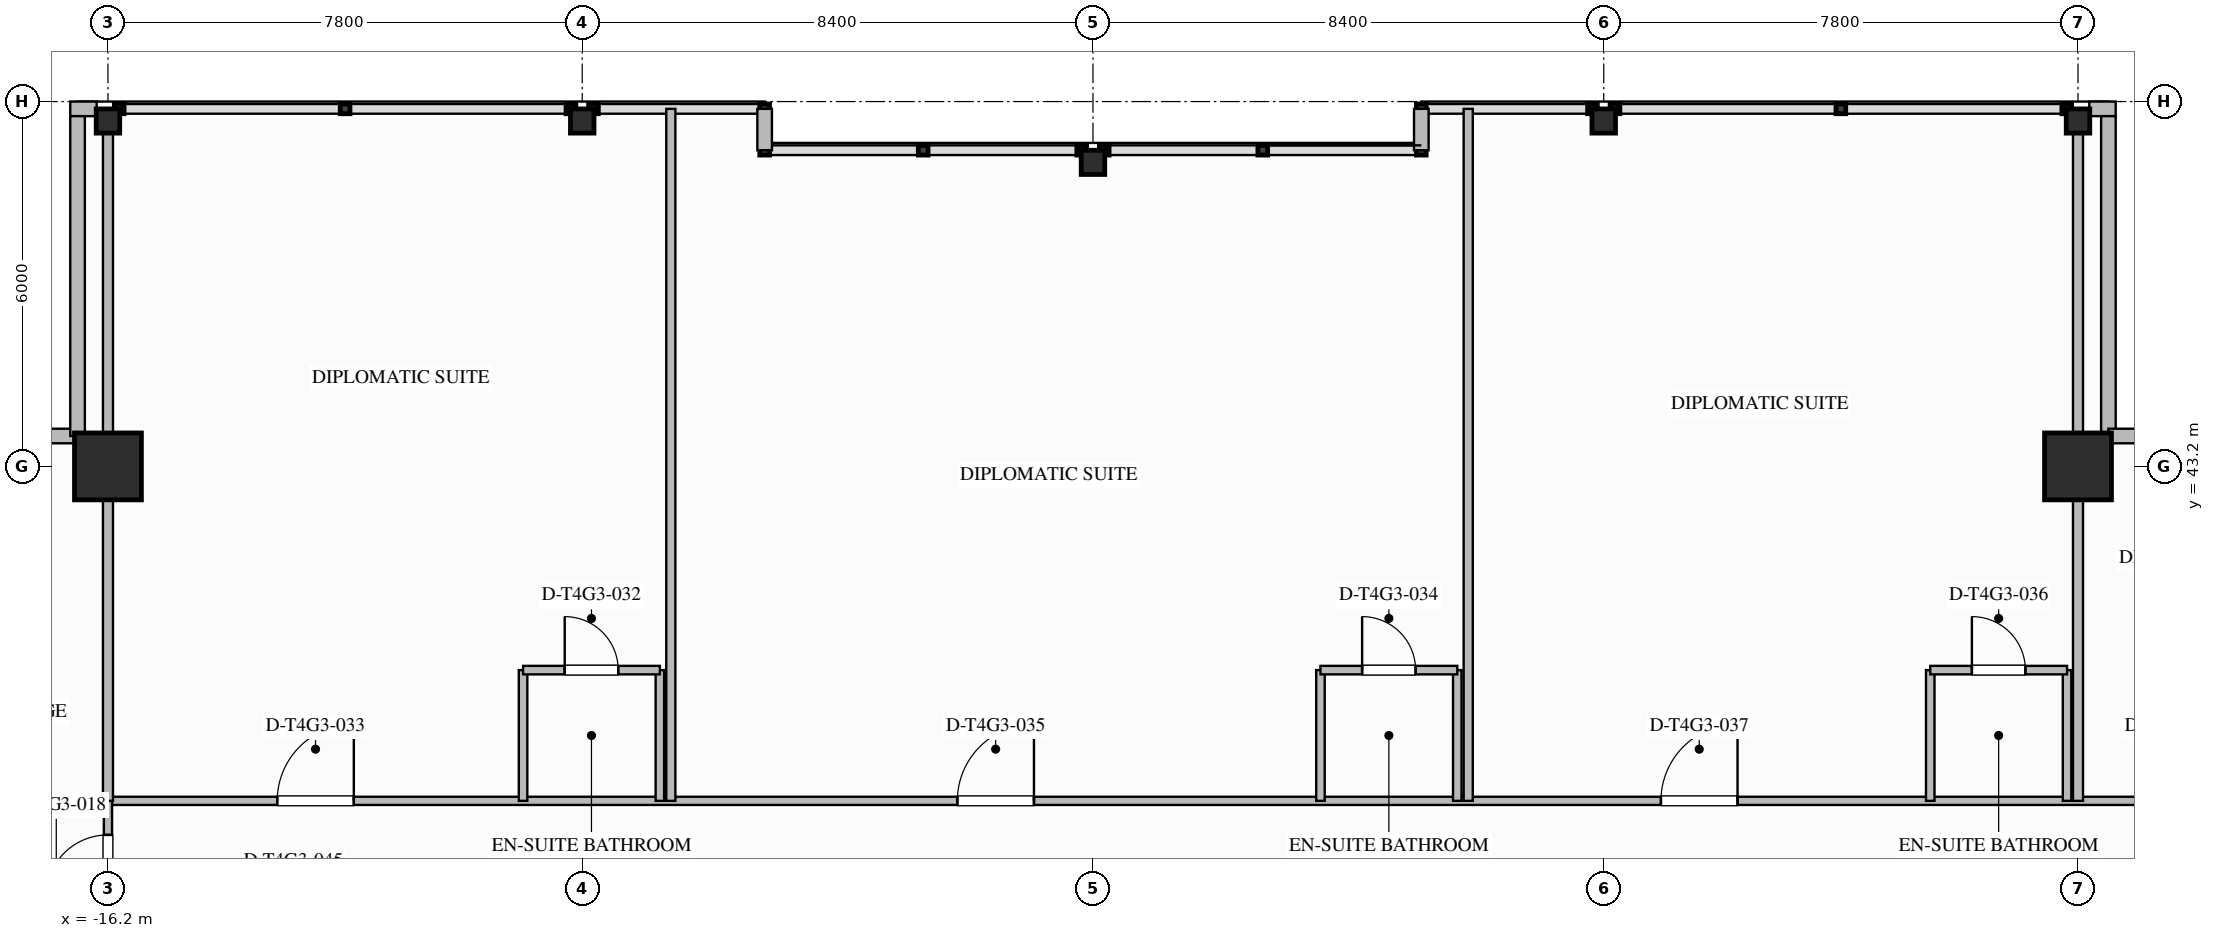
"""IFC4 building model, lengths in metres.
Left out: names, types, materials, properties, quantities, classifications, styles, units other than length and angle.
Written with IfcOpenShell. Run it as: python <this file> out.ifc"""

import sys

from ifc_helpers import new_model, si_unit, direction, frame, frame_2d, origin, origin_2d, place, context, subcontext, project, spatial, rectangle, i_section, extrude, element, fill, save


model = new_model("IFC4")
c1 = context("Model", 3, precision=1e-05, world=origin(), true_north=direction((0.0, 1.0)))
c2 = subcontext(c1, "Body", "Model", "MODEL_VIEW")
j1 = project(units=[si_unit("LENGTHUNIT", "METRE"), si_unit("PLANEANGLEUNIT", "RADIAN")], contexts=[c1])
p1 = place(None, origin())
s1 = spatial("IfcSite", under=j1, at=p1, CompositionType="ELEMENT")
p2 = place(p1, origin())
s2 = spatial("IfcBuilding", under=s1, at=p2, CompositionType="ELEMENT")
p3 = place(p2, frame((0.0, 0.0, 226.7)))
s3 = spatial("IfcBuildingStorey", under=s2, at=p3, CompositionType="ELEMENT", Elevation=226.7)
for number, where, z_axis, x_axis in (
    (1, (-16.2, 43.2, 0.0), (0.0, 0.0, 1.0), (1.0, 0.0, 0.0)),
    (2, (16.2, 43.2, 0.0), (0.0, 0.0, 1.0), (1.0, 0.0, 0.0)),
):
    element("IfcColumn", number, at=place(p3, frame(where, z_axis=z_axis, x_axis=x_axis)), inside=s3, PredefinedType="COLUMN", context=c2, shape_type="SweptSolid", body=[
        extrude(rectangle(XDim=1.1, YDim=1.1, at=origin_2d()), origin(), (0.0, 0.0, 1.0), 3.6),
    ])
for number, where, z_axis, x_axis in (
    (3, (-16.2, 48.88, 0.0), (0.0, 0.0, 1.0), (0.0, 1.0, 0.0)),
    (4, (-8.4, 48.88, 0.0), (0.0, 0.0, 1.0), (0.0, 1.0, 0.0)),
    (5, (0.0, 48.2, 0.0), (0.0, 0.0, 1.0), (0.0, 1.0, 0.0)),
    (6, (8.4, 48.88, 0.0), (0.0, 0.0, 1.0), (0.0, 1.0, 0.0)),
    (7, (16.2, 48.88, 0.0), (0.0, 0.0, 1.0), (0.0, 1.0, 0.0)),
):
    element("IfcColumn", number, at=place(p3, frame(where, z_axis=z_axis, x_axis=x_axis)), inside=s3, PredefinedType="COLUMN", context=c2, shape_type="SweptSolid", body=[
        extrude(i_section(OverallWidth=0.397, OverallDepth=0.387, WebThickness=0.021, FlangeThickness=0.033, FilletRadius=0.025, at=origin_2d()), origin(), (0.0, 0.0, 1.0), 3.597),
    ])
for number, where, z_axis, x_axis in (
    (8, (-16.82, 49.08, 0.0), (0.0, 0.0, 1.0), (1.0, 0.0, 0.0)),
    (9, (16.385, 49.08, 0.0), (0.0, 0.0, 1.0), (1.0, 0.0, 0.0)),
):
    element("IfcWall", number, at=place(p3, frame(where, z_axis=z_axis, x_axis=x_axis)), inside=s3, PredefinedType="STANDARD", context=c2, shape_type="SweptSolid", body=[
        extrude(rectangle(XDim=0.435, YDim=0.24, at=frame_2d((0.217, 0.0))), origin(), (0.0, 0.0, 1.0), 3.34),
    ])
for number, where, z_axis, x_axis in (
    (10, (-21.96, 43.7, 0.0), (0.0, 0.0, 1.0), (1.0, 0.0, 0.0)),
    (11, (-16.7, 43.7, 0.0), (0.0, 0.0, 1.0), (0.0, 1.0, 0.0)),
    (12, (16.7, 48.96, 0.0), (0.0, 0.0, 1.0), (0.0, -1.0, 0.0)),
    (13, (16.7, 43.7, 0.0), (0.0, 0.0, 1.0), (1.0, 0.0, 0.0)),
):
    element("IfcWall", number, at=place(p3, frame(where, z_axis=z_axis, x_axis=x_axis)), inside=s3, PredefinedType="STANDARD", context=c2, shape_type="SweptSolid", body=[
        extrude(rectangle(XDim=5.26, YDim=0.24, at=frame_2d((2.63, 0.0))), origin(), (0.0, 0.0, 1.0), 3.34),
    ])
for number, where, z_axis, x_axis in (
    (14, (-5.4, 49.08, 0.0), (0.0, 0.0, 1.0), (0.0, -1.0, 0.0)),
    (15, (5.4, 48.4, 0.0), (0.0, 0.0, 1.0), (0.0, 1.0, 0.0)),
):
    element("IfcWall", number, at=place(p3, frame(where, z_axis=z_axis, x_axis=x_axis)), inside=s3, PredefinedType="STANDARD", context=c2, shape_type="SweptSolid", body=[
        extrude(rectangle(XDim=0.68, YDim=0.24, at=frame_2d((0.34, 0.0))), origin(), (0.0, 0.0, 1.0), 3.34),
    ])
p4 = place(p3, frame((-16.2, 37.7, 0.0), z_axis=(0.0, 0.0, 1.0), x_axis=(1.0, 0.0, 0.0)))
e16 = element("IfcWall", 16, at=p4, inside=s3, PredefinedType="PARTITIONING", context=c2, shape_type="SweptSolid", body=[
    extrude(rectangle(XDim=38.28, YDim=0.135, at=frame_2d((19.14, 0.0))), origin(), (0.0, 0.0, 1.0), 3.34),
])
p5 = place(p4, frame((33.355, 0.0, 0.0)))
e17 = element("IfcOpeningElement", 17, at=p5, cuts=e16, PredefinedType="OPENING", context=c2, shape_type="SweptSolid", body=[
    extrude(rectangle(XDim=1.26, YDim=2.2, at=frame_2d((0.63, 1.1))), frame((0.0, 0.077, 0.0), z_axis=(0.0, -1.0, 0.0), x_axis=(1.0, 0.0, 0.0)), (0.0, 0.0, 1.0), 0.155),
])
p6 = place(p4, frame((2.784, 0.0, 0.0)))
e18 = element("IfcOpeningElement", 18, at=p6, cuts=e16, PredefinedType="OPENING", context=c2, shape_type="SweptSolid", body=[
    extrude(rectangle(XDim=1.26, YDim=2.2, at=frame_2d((0.63, 1.1))), frame((0.0, 0.077, 0.0), z_axis=(0.0, -1.0, 0.0), x_axis=(1.0, 0.0, 0.0)), (0.0, 0.0, 1.0), 0.155),
])
p7 = place(p4, frame((13.969, 0.0, 0.0)))
e19 = element("IfcOpeningElement", 19, at=p7, cuts=e16, PredefinedType="OPENING", context=c2, shape_type="SweptSolid", body=[
    extrude(rectangle(XDim=1.26, YDim=2.2, at=frame_2d((0.63, 1.1))), frame((0.0, 0.077, 0.0), z_axis=(0.0, -1.0, 0.0), x_axis=(1.0, 0.0, 0.0)), (0.0, 0.0, 1.0), 0.155),
])
p8 = place(p4, frame((25.541, 0.0, 0.0)))
e20 = element("IfcOpeningElement", 20, at=p8, cuts=e16, PredefinedType="OPENING", context=c2, shape_type="SweptSolid", body=[
    extrude(rectangle(XDim=1.26, YDim=2.2, at=frame_2d((0.63, 1.1))), frame((0.0, 0.077, 0.0), z_axis=(0.0, -1.0, 0.0), x_axis=(1.0, 0.0, 0.0)), (0.0, 0.0, 1.0), 0.155),
])
p9 = place(p3, frame((-16.2, 35.6, 0.0), z_axis=(0.0, 0.0, 1.0), x_axis=(0.0, 1.0, 0.0)))
e21 = element("IfcWall", 21, at=p9, inside=s3, PredefinedType="PARTITIONING", context=c2, shape_type="SweptSolid", body=[
    extrude(rectangle(XDim=2.1, YDim=0.135, at=frame_2d((1.05, 0.0))), origin(), (0.0, 0.0, 1.0), 2.714),
])
p10 = place(p9, frame((0.52, 0.0, 0.0)))
e22 = element("IfcOpeningElement", 22, at=p10, cuts=e21, PredefinedType="OPENING", context=c2, shape_type="SweptSolid", body=[
    extrude(rectangle(XDim=1.02, YDim=2.15, at=frame_2d((0.51, 1.075))), frame((0.0, 0.077, 0.0), z_axis=(0.0, -1.0, 0.0), x_axis=(1.0, 0.0, 0.0)), (0.0, 0.0, 1.0), 0.155),
])
for number, where, z_axis, x_axis in (
    (23, (-16.2, 37.7, 0.0), (0.0, 0.0, 1.0), (0.0, 1.0, 0.0)),
    (24, (16.2, 37.7, 0.0), (0.0, 0.0, 1.0), (0.0, 1.0, 0.0)),
):
    element("IfcWall", number, at=place(p3, frame(where, z_axis=z_axis, x_axis=x_axis)), inside=s3, PredefinedType="PARTITIONING", context=c2, shape_type="SweptSolid", body=[
        extrude(rectangle(XDim=11.38, YDim=0.165, at=frame_2d((5.69, 0.0))), origin(), (0.0, 0.0, 1.0), 2.714),
    ])
for number, where, z_axis, x_axis in (
    (25, (-9.373, 37.7, 0.0), (0.0, 0.0, 1.0), (0.0, 1.0, 0.0)),
    (26, (-7.123, 37.7, 0.0), (0.0, 0.0, 1.0), (0.0, 1.0, 0.0)),
):
    element("IfcWall", number, at=place(p3, frame(where, z_axis=z_axis, x_axis=x_axis)), inside=s3, PredefinedType="PLUMBINGWALL", context=c2, shape_type="SweptSolid", body=[
        extrude(rectangle(XDim=2.15, YDim=0.14, at=frame_2d((1.075, 0.0))), origin(), (0.0, 0.0, 1.0), 3.34),
    ])
p11 = place(p3, frame((-9.373, 39.85, 0.0), z_axis=(0.0, 0.0, 1.0), x_axis=(1.0, 0.0, 0.0)))
e27 = element("IfcWall", 27, at=p11, inside=s3, PredefinedType="PLUMBINGWALL", context=c2, shape_type="SweptSolid", body=[
    extrude(rectangle(XDim=2.25, YDim=0.14, at=frame_2d((1.125, 0.0))), origin(), (0.0, 0.0, 1.0), 3.34),
])
p12 = place(p11, frame((0.685, 0.0, 0.0)))
e28 = element("IfcOpeningElement", 28, at=p12, cuts=e27, PredefinedType="OPENING", context=c2, shape_type="SweptSolid", body=[
    extrude(rectangle(XDim=0.88, YDim=2.1, at=frame_2d((0.44, 1.05))), frame((0.0, 0.08, 0.0), z_axis=(0.0, -1.0, 0.0), x_axis=(1.0, 0.0, 0.0)), (0.0, 0.0, 1.0), 0.16),
])
p13 = place(p3, frame((-6.943, 37.7, 0.0), z_axis=(0.0, 0.0, 1.0), x_axis=(0.0, 1.0, 0.0)))
e29 = element("IfcWall", 29, at=p13, inside=s3, PredefinedType="PARTITIONING", context=c2, shape_type="SweptSolid", body=[
    extrude(rectangle(XDim=11.38, YDim=0.15, at=frame_2d((5.69, 0.0))), origin(), (0.0, 0.0, 1.0), 3.34),
])
for number, where, z_axis, x_axis in (
    (30, (3.741, 37.7, 0.0), (0.0, 0.0, 1.0), (0.0, 1.0, 0.0)),
    (31, (5.991, 37.7, 0.0), (0.0, 0.0, 1.0), (0.0, 1.0, 0.0)),
):
    element("IfcWall", number, at=place(p3, frame(where, z_axis=z_axis, x_axis=x_axis)), inside=s3, PredefinedType="PLUMBINGWALL", context=c2, shape_type="SweptSolid", body=[
        extrude(rectangle(XDim=2.15, YDim=0.14, at=frame_2d((1.075, 0.0))), origin(), (0.0, 0.0, 1.0), 3.34),
    ])
p14 = place(p3, frame((3.741, 39.85, 0.0), z_axis=(0.0, 0.0, 1.0), x_axis=(1.0, 0.0, 0.0)))
e32 = element("IfcWall", 32, at=p14, inside=s3, PredefinedType="PLUMBINGWALL", context=c2, shape_type="SweptSolid", body=[
    extrude(rectangle(XDim=2.25, YDim=0.14, at=frame_2d((1.125, 0.0))), origin(), (0.0, 0.0, 1.0), 3.34),
])
p15 = place(p14, frame((0.685, 0.0, 0.0)))
e33 = element("IfcOpeningElement", 33, at=p15, cuts=e32, PredefinedType="OPENING", context=c2, shape_type="SweptSolid", body=[
    extrude(rectangle(XDim=0.88, YDim=2.1, at=frame_2d((0.44, 1.05))), frame((0.0, 0.08, 0.0), z_axis=(0.0, -1.0, 0.0), x_axis=(1.0, 0.0, 0.0)), (0.0, 0.0, 1.0), 0.16),
])
p16 = place(p3, frame((6.171, 37.7, 0.0), z_axis=(0.0, 0.0, 1.0), x_axis=(0.0, 1.0, 0.0)))
e34 = element("IfcWall", 34, at=p16, inside=s3, PredefinedType="PARTITIONING", context=c2, shape_type="SweptSolid", body=[
    extrude(rectangle(XDim=11.38, YDim=0.15, at=frame_2d((5.69, 0.0))), origin(), (0.0, 0.0, 1.0), 3.34),
])
p17 = place(p3, frame((13.77, 37.7, 0.0), z_axis=(0.0, 0.0, 1.0), x_axis=(0.0, 1.0, 0.0)))
e35 = element("IfcWall", 35, at=p17, inside=s3, PredefinedType="PLUMBINGWALL", context=c2, shape_type="SweptSolid", body=[
    extrude(rectangle(XDim=2.15, YDim=0.14, at=frame_2d((1.075, 0.0))), origin(), (0.0, 0.0, 1.0), 3.34),
])
p18 = place(p3, frame((16.02, 37.7, 0.0), z_axis=(0.0, 0.0, 1.0), x_axis=(0.0, 1.0, 0.0)))
e36 = element("IfcWall", 36, at=p18, inside=s3, PredefinedType="PLUMBINGWALL", context=c2, shape_type="SweptSolid", body=[
    extrude(rectangle(XDim=2.15, YDim=0.14, at=frame_2d((1.075, 0.0))), origin(), (0.0, 0.0, 1.0), 2.714),
])
p19 = place(p3, frame((13.77, 39.85, 0.0), z_axis=(0.0, 0.0, 1.0), x_axis=(1.0, 0.0, 0.0)))
e37 = element("IfcWall", 37, at=p19, inside=s3, PredefinedType="PLUMBINGWALL", context=c2, shape_type="SweptSolid", body=[
    extrude(rectangle(XDim=2.25, YDim=0.14, at=frame_2d((1.125, 0.0))), origin(), (0.0, 0.0, 1.0), 3.34),
])
p20 = place(p19, frame((0.685, 0.0, 0.0)))
e38 = element("IfcOpeningElement", 38, at=p20, cuts=e37, PredefinedType="OPENING", context=c2, shape_type="SweptSolid", body=[
    extrude(rectangle(XDim=0.88, YDim=2.1, at=frame_2d((0.44, 1.05))), frame((0.0, 0.08, 0.0), z_axis=(0.0, -1.0, 0.0), x_axis=(1.0, 0.0, 0.0)), (0.0, 0.0, 1.0), 0.16),
])
p21 = place(p10, origin())
e39 = element("IfcDoor", 39, at=p21, inside=s3, OperationType="SINGLE_SWING_LEFT", PredefinedType="DOOR", context=c2, shape_type="SweptSolid", body=[
    extrude(rectangle(XDim=1.02, YDim=2.15, at=frame_2d((0.51, 1.075))), frame((0.0, 0.025, 0.0), z_axis=(0.0, -1.0, 0.0), x_axis=(1.0, 0.0, 0.0)), (0.0, 0.0, 1.0), 0.05),
])
fill(e22, e39)
p22 = place(p12, origin())
e40 = element("IfcDoor", 40, at=p22, inside=s3, OperationType="SINGLE_SWING_LEFT", PredefinedType="DOOR", context=c2, shape_type="SweptSolid", body=[
    extrude(rectangle(XDim=0.88, YDim=2.1, at=frame_2d((0.44, 1.05))), frame((0.0, 0.025, 0.0), z_axis=(0.0, -1.0, 0.0), x_axis=(1.0, 0.0, 0.0)), (0.0, 0.0, 1.0), 0.05),
])
fill(e28, e40)
p23 = place(p6, origin())
e41 = element("IfcDoor", 41, at=p23, inside=s3, OperationType="SINGLE_SWING_RIGHT", PredefinedType="DOOR", context=c2, shape_type="SweptSolid", body=[
    extrude(rectangle(XDim=1.26, YDim=2.2, at=frame_2d((0.63, 1.1))), frame((0.0, 0.025, 0.0), z_axis=(0.0, -1.0, 0.0), x_axis=(1.0, 0.0, 0.0)), (0.0, 0.0, 1.0), 0.05),
])
fill(e18, e41)
p24 = place(p15, origin())
e42 = element("IfcDoor", 42, at=p24, inside=s3, OperationType="SINGLE_SWING_LEFT", PredefinedType="DOOR", context=c2, shape_type="SweptSolid", body=[
    extrude(rectangle(XDim=0.88, YDim=2.1, at=frame_2d((0.44, 1.05))), frame((0.0, 0.025, 0.0), z_axis=(0.0, -1.0, 0.0), x_axis=(1.0, 0.0, 0.0)), (0.0, 0.0, 1.0), 0.05),
])
fill(e33, e42)
p25 = place(p7, origin())
e43 = element("IfcDoor", 43, at=p25, inside=s3, OperationType="SINGLE_SWING_RIGHT", PredefinedType="DOOR", context=c2, shape_type="SweptSolid", body=[
    extrude(rectangle(XDim=1.26, YDim=2.2, at=frame_2d((0.63, 1.1))), frame((0.0, 0.025, 0.0), z_axis=(0.0, -1.0, 0.0), x_axis=(1.0, 0.0, 0.0)), (0.0, 0.0, 1.0), 0.05),
])
fill(e19, e43)
p26 = place(p20, origin())
e44 = element("IfcDoor", 44, at=p26, inside=s3, OperationType="SINGLE_SWING_LEFT", PredefinedType="DOOR", context=c2, shape_type="SweptSolid", body=[
    extrude(rectangle(XDim=0.88, YDim=2.1, at=frame_2d((0.44, 1.05))), frame((0.0, 0.025, 0.0), z_axis=(0.0, -1.0, 0.0), x_axis=(1.0, 0.0, 0.0)), (0.0, 0.0, 1.0), 0.05),
])
fill(e38, e44)
p27 = place(p8, origin())
e45 = element("IfcDoor", 45, at=p27, inside=s3, OperationType="SINGLE_SWING_RIGHT", PredefinedType="DOOR", context=c2, shape_type="SweptSolid", body=[
    extrude(rectangle(XDim=1.26, YDim=2.2, at=frame_2d((0.63, 1.1))), frame((0.0, 0.025, 0.0), z_axis=(0.0, -1.0, 0.0), x_axis=(1.0, 0.0, 0.0)), (0.0, 0.0, 1.0), 0.05),
])
fill(e20, e45)
save(model, sys.argv[1])
